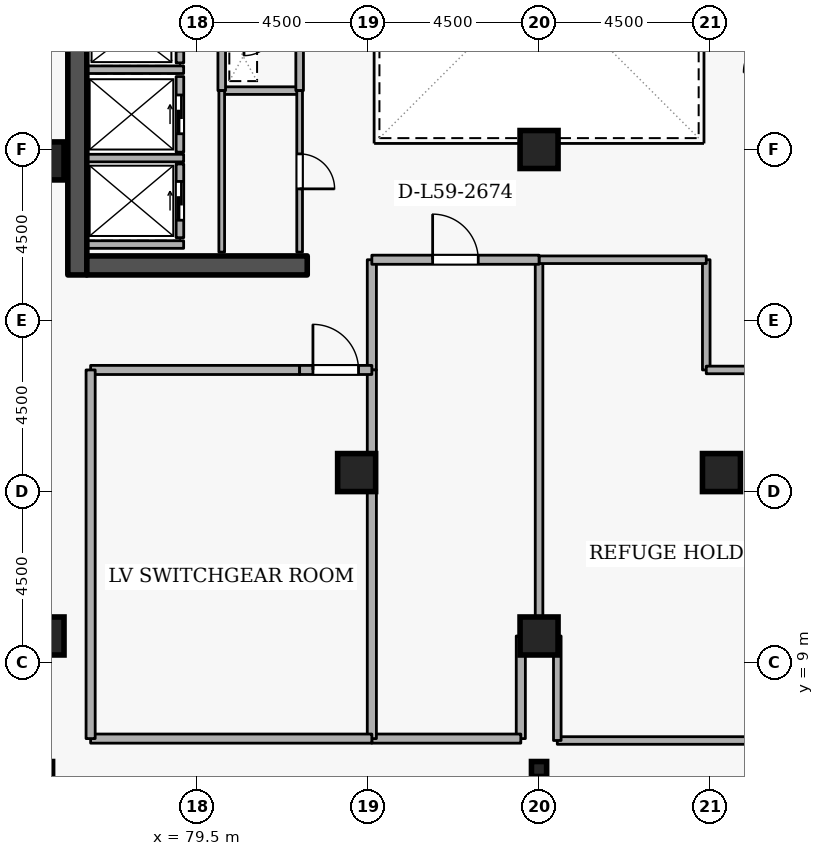
"""IFC4 building model, lengths in metres.
Left out: names, types, materials, properties, quantities, classifications, styles, units other than length and angle.
Written with IfcOpenShell. Run it as: python <this file> out.ifc"""

import sys

from ifc_helpers import new_model, si_unit, direction, frame, frame_2d, origin, origin_2d, place, context, subcontext, project, spatial, rectangle, i_section, extrude, element, fill, save


model = new_model("IFC4")
c1 = context("Model", 3, precision=1e-05, world=origin(), true_north=direction((0.0, 1.0)))
c2 = subcontext(c1, "Body", "Model", "MODEL_VIEW")
j1 = project(units=[si_unit("LENGTHUNIT", "METRE"), si_unit("PLANEANGLEUNIT", "RADIAN")], contexts=[c1])
p1 = place(None, origin())
s1 = spatial("IfcSite", under=j1, at=p1, CompositionType="ELEMENT")
p2 = place(p1, origin())
s2 = spatial("IfcBuilding", under=s1, at=p2, CompositionType="ELEMENT")
p3 = place(p2, frame((0.0, 0.0, 221.7)))
s3 = spatial("IfcBuildingStorey", under=s2, at=p3, CompositionType="ELEMENT", Elevation=221.7)
p4 = place(p3, frame((76.35, 19.2, 0.0), z_axis=(0.0, 0.0, 1.0), x_axis=(0.0, 1.0, 0.0)))
e1 = element("IfcWall", 1, at=p4, inside=s3, PredefinedType="SHEAR", context=c2, shape_type="SweptSolid", body=[
    extrude(rectangle(XDim=15.6, YDim=0.5, at=frame_2d((7.8, 0.0))), origin(), (0.0, 0.0, 1.0), 4.2),
])
p5 = place(p3, frame((76.6, 19.45, 0.0), z_axis=(0.0, 0.0, 1.0), x_axis=(1.0, 0.0, 0.0)))
e2 = element("IfcWall", 2, at=p5, inside=s3, PredefinedType="SHEAR", context=c2, shape_type="SweptSolid", body=[
    extrude(rectangle(XDim=5.8, YDim=0.5, at=frame_2d((2.9, 0.0))), origin(), (0.0, 0.0, 1.0), 4.2),
])
for number, where, z_axis, x_axis in (
    (3, (88.5, 9.7, 0.0), (0.0, 0.0, 1.0), (1.0, 0.0, 0.0)),
    (4, (75.5, 9.7, 0.0), (0.0, 0.0, 1.0), (1.0, 0.0, 0.0)),
    (5, (93.3, 14.0, 0.0), (0.0, 0.0, 1.0), (1.0, 0.0, 0.0)),
    (6, (83.7, 14.0, 0.0), (0.0, 0.0, 1.0), (1.0, 0.0, 0.0)),
    (7, (75.5, 22.2, 0.0), (0.0, 0.0, 1.0), (1.0, 0.0, 0.0)),
    (8, (88.5, 22.5, 0.0), (0.0, 0.0, 1.0), (1.0, 0.0, 0.0)),
):
    element("IfcColumn", number, at=place(p3, frame(where, z_axis=z_axis, x_axis=x_axis)), inside=s3, PredefinedType="COLUMN", context=c2, shape_type="SweptSolid", body=[
        extrude(rectangle(XDim=1.0, YDim=1.0, at=origin_2d()), origin(), (0.0, 0.0, 1.0), 4.2),
    ])
p6 = place(p3, frame((88.5, 6.2, 0.0), z_axis=(0.0, 0.0, 1.0), x_axis=(1.0, 0.0, 0.0)))
e9 = element("IfcColumn", 9, at=p6, inside=s3, PredefinedType="COLUMN", context=c2, shape_type="SweptSolid", body=[
    extrude(i_section(OverallWidth=0.399, OverallDepth=0.394, WebThickness=0.023, FlangeThickness=0.037, FilletRadius=0.015, at=origin_2d()), origin(), (0.0, 0.0, 1.0), 4.2),
])
p7 = place(p3, frame((79.05, 24.78, 0.0), z_axis=(0.0, 0.0, 1.0), x_axis=(0.0, 1.0, 0.0)))
e10 = element("IfcWall", 10, at=p7, inside=s3, PredefinedType="STANDARD", context=c2, shape_type="SweptSolid", body=[
    extrude(rectangle(XDim=1.64, YDim=0.2, at=frame_2d((0.82, 0.0))), origin(), (0.0, 0.0, 1.0), 3.94),
])
p8 = place(p7, frame((0.31, 0.0, 0.0)))
e11 = element("IfcOpeningElement", 11, at=p8, cuts=e10, PredefinedType="OPENING", context=c2, shape_type="SweptSolid", body=[
    extrude(rectangle(XDim=1.02, YDim=2.06, at=frame_2d((0.51, 1.03))), frame((0.0, 0.11, 0.0), z_axis=(0.0, -1.0, 0.0), x_axis=(1.0, 0.0, 0.0)), (0.0, 0.0, 1.0), 0.22),
])
p9 = place(p3, frame((79.05, 22.43, 0.0), z_axis=(0.0, 0.0, 1.0), x_axis=(0.0, 1.0, 0.0)))
e12 = element("IfcWall", 12, at=p9, inside=s3, PredefinedType="STANDARD", context=c2, shape_type="SweptSolid", body=[
    extrude(rectangle(XDim=1.99, YDim=0.2, at=frame_2d((0.995, 0.0))), origin(), (0.0, 0.0, 1.0), 3.94),
])
p10 = place(p9, frame((0.485, 0.0, 0.0)))
e13 = element("IfcOpeningElement", 13, at=p10, cuts=e12, PredefinedType="OPENING", context=c2, shape_type="SweptSolid", body=[
    extrude(rectangle(XDim=1.02, YDim=2.06, at=frame_2d((0.51, 1.03))), frame((0.0, 0.11, 0.0), z_axis=(0.0, -1.0, 0.0), x_axis=(1.0, 0.0, 0.0)), (0.0, 0.0, 1.0), 0.22),
])
p11 = place(p3, frame((79.05, 20.18, 0.0), z_axis=(0.0, 0.0, 1.0), x_axis=(0.0, 1.0, 0.0)))
e14 = element("IfcWall", 14, at=p11, inside=s3, PredefinedType="STANDARD", context=c2, shape_type="SweptSolid", body=[
    extrude(rectangle(XDim=1.94, YDim=0.2, at=frame_2d((0.97, 0.0))), origin(), (0.0, 0.0, 1.0), 3.94),
])
p12 = place(p11, frame((0.46, 0.0, 0.0)))
e15 = element("IfcOpeningElement", 15, at=p12, cuts=e14, PredefinedType="OPENING", context=c2, shape_type="SweptSolid", body=[
    extrude(rectangle(XDim=1.02, YDim=2.06, at=frame_2d((0.51, 1.03))), frame((0.0, 0.11, 0.0), z_axis=(0.0, -1.0, 0.0), x_axis=(1.0, 0.0, 0.0)), (0.0, 0.0, 1.0), 0.22),
])
for number, where, z_axis, x_axis in (
    (16, (76.612, 24.6, 0.0), (0.0, 0.0, 1.0), (1.0, 0.0, 0.0)),
    (17, (76.612, 22.275, 0.0), (0.0, 0.0, 1.0), (1.0, 0.0, 0.0)),
    (18, (76.612, 20.0, 0.0), (0.0, 0.0, 1.0), (1.0, 0.0, 0.0)),
):
    element("IfcWall", number, at=place(p3, frame(where, z_axis=z_axis, x_axis=x_axis)), inside=s3, PredefinedType="STANDARD", context=c2, shape_type="SweptSolid", body=[
        extrude(rectangle(XDim=2.536, YDim=0.2, at=frame_2d((1.268, 0.0))), origin(), (0.0, 0.0, 1.0), 3.94),
    ])
p13 = place(p3, frame((80.15, 24.05, 0.0), z_axis=(0.0, 0.0, 1.0), x_axis=(1.0, 0.0, 0.0)))
e19 = element("IfcWall", 19, at=p13, inside=s3, PredefinedType="STANDARD", context=c2, shape_type="SweptSolid", body=[
    extrude(rectangle(XDim=2.05, YDim=0.2, at=frame_2d((1.025, 0.0))), origin(), (0.0, 0.0, 1.0), 3.94),
])
for number, where, z_axis, x_axis in (
    (20, (82.2, 24.05, 0.0), (0.0, 0.0, 1.0), (0.0, 1.0, 0.0)),
    (21, (80.15, 25.85, 0.0), (0.0, 0.0, 1.0), (0.0, -1.0, 0.0)),
):
    element("IfcWall", number, at=place(p3, frame(where, z_axis=z_axis, x_axis=x_axis)), inside=s3, PredefinedType="STANDARD", context=c2, shape_type="SweptSolid", body=[
        extrude(rectangle(XDim=1.8, YDim=0.2, at=frame_2d((0.9, 0.0))), origin(), (0.0, 0.0, 1.0), 3.94),
    ])
p14 = place(p3, frame((92.9, 19.6, 0.0), z_axis=(0.0, 0.0, 1.0), x_axis=(0.0, -1.0, 0.0)))
e22 = element("IfcWall", 22, at=p14, inside=s3, PredefinedType="STANDARD", context=c2, shape_type="SweptSolid", body=[
    extrude(rectangle(XDim=2.9, YDim=0.2, at=frame_2d((1.45, 0.0))), origin(), (0.0, 0.0, 1.0), 3.94),
])
p15 = place(p3, frame((92.9, 16.7, 0.0), z_axis=(0.0, 0.0, 1.0), x_axis=(1.0, 0.0, 0.0)))
e23 = element("IfcWall", 23, at=p15, inside=s3, PredefinedType="STANDARD", context=c2, shape_type="SweptSolid", body=[
    extrude(rectangle(XDim=1.9, YDim=0.2, at=frame_2d((0.95, 0.0))), origin(), (0.0, 0.0, 1.0), 3.94),
])
p16 = place(p3, frame((101.02, 6.95, 0.0), z_axis=(0.0, 0.0, 1.0), x_axis=(-1.0, 0.0, 0.0)))
e24 = element("IfcWall", 24, at=p16, inside=s3, PredefinedType="STANDARD", context=c2, shape_type="SweptSolid", body=[
    extrude(rectangle(XDim=12.04, YDim=0.2, at=frame_2d((6.02, 0.0))), origin(), (0.0, 0.0, 1.0), 3.94),
])
p17 = place(p3, frame((88.98, 6.95, 0.0), z_axis=(0.0, 0.0, 1.0), x_axis=(0.0, 1.0, 0.0)))
e25 = element("IfcWall", 25, at=p17, inside=s3, PredefinedType="STANDARD", context=c2, shape_type="SweptSolid", body=[
    extrude(rectangle(XDim=2.75, YDim=0.2, at=frame_2d((1.375, 0.0))), origin(), (0.0, 0.0, 1.0), 3.94),
])
p18 = place(p3, frame((88.5, 9.7, 0.0), z_axis=(0.0, 0.0, 1.0), x_axis=(0.0, 1.0, 0.0)))
e26 = element("IfcWall", 26, at=p18, inside=s3, PredefinedType="STANDARD", context=c2, shape_type="SweptSolid", body=[
    extrude(rectangle(XDim=9.9, YDim=0.2, at=frame_2d((4.95, 0.0))), origin(), (0.0, 0.0, 1.0), 3.325),
])
p19 = place(p3, frame((88.5, 19.6, 0.0), z_axis=(0.0, 0.0, 1.0), x_axis=(1.0, 0.0, 0.0)))
e27 = element("IfcWall", 27, at=p19, inside=s3, PredefinedType="STANDARD", context=c2, shape_type="SweptSolid", body=[
    extrude(rectangle(XDim=4.4, YDim=0.2, at=frame_2d((2.2, 0.0))), origin(), (0.0, 0.0, 1.0), 3.145),
])
p20 = place(p3, frame((84.1, 16.7, 0.0), z_axis=(0.0, 0.0, 1.0), x_axis=(0.0, 1.0, 0.0)))
e28 = element("IfcWall", 28, at=p20, inside=s3, PredefinedType="STANDARD", context=c2, shape_type="SweptSolid", body=[
    extrude(rectangle(XDim=2.9, YDim=0.24, at=frame_2d((1.45, 0.0))), origin(), (0.0, 0.0, 1.0), 3.94),
])
p21 = place(p3, frame((84.1, 19.6, 0.0), z_axis=(0.0, 0.0, 1.0), x_axis=(1.0, 0.0, 0.0)))
e29 = element("IfcWall", 29, at=p21, inside=s3, PredefinedType="STANDARD", context=c2, shape_type="SweptSolid", body=[
    extrude(rectangle(XDim=4.4, YDim=0.24, at=frame_2d((2.2, 0.0))), origin(), (0.0, 0.0, 1.0), 3.145),
])
p22 = place(p21, frame((1.6, 0.0, 0.0)))
e30 = element("IfcOpeningElement", 30, at=p22, cuts=e29, PredefinedType="OPENING", context=c2, shape_type="SweptSolid", body=[
    extrude(rectangle(XDim=1.2, YDim=2.1, at=frame_2d((0.6, 1.05))), frame((0.0, 0.13, 0.0), z_axis=(0.0, -1.0, 0.0), x_axis=(1.0, 0.0, 0.0)), (0.0, 0.0, 1.0), 0.26),
])
p23 = place(p3, frame((88.02, 9.7, 0.0), z_axis=(0.0, 0.0, 1.0), x_axis=(0.0, -1.0, 0.0)))
e31 = element("IfcWall", 31, at=p23, inside=s3, PredefinedType="STANDARD", context=c2, shape_type="SweptSolid", body=[
    extrude(rectangle(XDim=2.7, YDim=0.24, at=frame_2d((1.35, 0.0))), origin(), (0.0, 0.0, 1.0), 3.94),
])
p24 = place(p3, frame((88.02, 7.0, 0.0), z_axis=(0.0, 0.0, 1.0), x_axis=(-1.0, 0.0, 0.0)))
e32 = element("IfcWall", 32, at=p24, inside=s3, PredefinedType="STANDARD", context=c2, shape_type="SweptSolid", body=[
    extrude(rectangle(XDim=3.92, YDim=0.24, at=frame_2d((1.96, 0.0))), origin(), (0.0, 0.0, 1.0), 3.94),
])
p25 = place(p3, frame((84.1, 7.0, 0.0), z_axis=(0.0, 0.0, 1.0), x_axis=(0.0, 1.0, 0.0)))
e33 = element("IfcWall", 33, at=p25, inside=s3, PredefinedType="STANDARD", context=c2, shape_type="SweptSolid", body=[
    extrude(rectangle(XDim=9.7, YDim=0.24, at=frame_2d((4.85, 0.0))), origin(), (0.0, 0.0, 1.0), 3.94),
])
p26 = place(p3, frame((76.7, 16.7, 0.0), z_axis=(0.0, 0.0, 1.0), x_axis=(1.0, 0.0, 0.0)))
e34 = element("IfcWall", 34, at=p26, inside=s3, PredefinedType="STANDARD", context=c2, shape_type="SweptSolid", body=[
    extrude(rectangle(XDim=5.5, YDim=0.24, at=frame_2d((2.75, 0.0))), origin(), (0.0, 0.0, 1.0), 3.94),
])
p27 = place(p3, frame((82.2, 16.7, 0.0), z_axis=(0.0, 0.0, 1.0), x_axis=(1.0, 0.0, 0.0)))
e35 = element("IfcWall", 35, at=p27, inside=s3, PredefinedType="STANDARD", context=c2, shape_type="SweptSolid", body=[
    extrude(rectangle(XDim=1.9, YDim=0.24, at=frame_2d((0.95, 0.0))), origin(), (0.0, 0.0, 1.0), 3.94),
])
p28 = place(p27, frame((0.35, 0.0, 0.0)))
e36 = element("IfcOpeningElement", 36, at=p28, cuts=e35, PredefinedType="OPENING", context=c2, shape_type="SweptSolid", body=[
    extrude(rectangle(XDim=1.2, YDim=2.1, at=frame_2d((0.6, 1.05))), frame((0.0, 0.13, 0.0), z_axis=(0.0, -1.0, 0.0), x_axis=(1.0, 0.0, 0.0)), (0.0, 0.0, 1.0), 0.26),
])
p29 = place(p3, frame((84.1, 7.0, 0.0), z_axis=(0.0, 0.0, 1.0), x_axis=(-1.0, 0.0, 0.0)))
e37 = element("IfcWall", 37, at=p29, inside=s3, PredefinedType="STANDARD", context=c2, shape_type="SweptSolid", body=[
    extrude(rectangle(XDim=7.4, YDim=0.24, at=frame_2d((3.7, 0.0))), origin(), (0.0, 0.0, 1.0), 3.445),
])
p30 = place(p3, frame((76.7, 7.0, 0.0), z_axis=(0.0, 0.0, 1.0), x_axis=(0.0, 1.0, 0.0)))
e38 = element("IfcWall", 38, at=p30, inside=s3, PredefinedType="STANDARD", context=c2, shape_type="SweptSolid", body=[
    extrude(rectangle(XDim=9.7, YDim=0.24, at=frame_2d((4.85, 0.0))), origin(), (0.0, 0.0, 1.0), 3.94),
])
p31 = place(p3, frame((80.15, 19.8, 0.0), z_axis=(0.0, 0.0, 1.0), x_axis=(0.0, 1.0, 0.0)))
e39 = element("IfcWall", 39, at=p31, inside=s3, PredefinedType="PARTITIONING", context=c2, shape_type="SweptSolid", body=[
    extrude(rectangle(XDim=4.25, YDim=0.15, at=frame_2d((2.125, 0.0))), origin(), (0.0, 0.0, 1.0), 3.94),
])
p32 = place(p3, frame((82.2, 24.05, 0.0), z_axis=(0.0, 0.0, 1.0), x_axis=(0.0, -1.0, 0.0)))
e40 = element("IfcWall", 40, at=p32, inside=s3, PredefinedType="PARTITIONING", context=c2, shape_type="SweptSolid", body=[
    extrude(rectangle(XDim=4.25, YDim=0.15, at=frame_2d((2.125, 0.0))), origin(), (0.0, 0.0, 1.0), 3.94),
])
p33 = place(p32, frame((1.665, 0.0, 0.0)))
e41 = element("IfcOpeningElement", 41, at=p33, cuts=e40, PredefinedType="OPENING", context=c2, shape_type="SweptSolid", body=[
    extrude(rectangle(XDim=0.92, YDim=2.08, at=frame_2d((0.46, 1.04))), frame((0.0, 0.085, 0.0), z_axis=(0.0, -1.0, 0.0), x_axis=(1.0, 0.0, 0.0)), (0.0, 0.0, 1.0), 0.17),
])
p34 = place(p10, origin())
e42 = element("IfcDoor", 42, at=p34, inside=s3, OperationType="SLIDING_TO_LEFT", PredefinedType="DOOR", context=c2, shape_type="SweptSolid", body=[
    extrude(rectangle(XDim=1.02, YDim=2.06, at=frame_2d((0.51, 1.03))), frame((0.0, 0.025, 0.0), z_axis=(0.0, -1.0, 0.0), x_axis=(1.0, 0.0, 0.0)), (0.0, 0.0, 1.0), 0.05),
])
fill(e13, e42)
p35 = place(p12, origin())
e43 = element("IfcDoor", 43, at=p35, inside=s3, OperationType="SLIDING_TO_LEFT", PredefinedType="DOOR", context=c2, shape_type="SweptSolid", body=[
    extrude(rectangle(XDim=1.02, YDim=2.06, at=frame_2d((0.51, 1.03))), frame((0.0, 0.025, 0.0), z_axis=(0.0, -1.0, 0.0), x_axis=(1.0, 0.0, 0.0)), (0.0, 0.0, 1.0), 0.05),
])
fill(e15, e43)
p36 = place(p33, origin())
e44 = element("IfcDoor", 44, at=p36, inside=s3, OperationType="SINGLE_SWING_RIGHT", PredefinedType="DOOR", context=c2, shape_type="SweptSolid", body=[
    extrude(rectangle(XDim=0.92, YDim=2.08, at=frame_2d((0.46, 1.04))), frame((0.0, 0.025, 0.0), z_axis=(0.0, -1.0, 0.0), x_axis=(1.0, 0.0, 0.0)), (0.0, 0.0, 1.0), 0.05),
])
fill(e41, e44)
p37 = place(p22, origin())
e45 = element("IfcDoor", 45, at=p37, inside=s3, OperationType="SINGLE_SWING_LEFT", PredefinedType="DOOR", context=c2, shape_type="SweptSolid", body=[
    extrude(rectangle(XDim=1.2, YDim=2.1, at=frame_2d((0.6, 1.05))), frame((0.0, 0.025, 0.0), z_axis=(0.0, -1.0, 0.0), x_axis=(1.0, 0.0, 0.0)), (0.0, 0.0, 1.0), 0.05),
])
fill(e30, e45)
p38 = place(p28, origin())
e46 = element("IfcDoor", 46, at=p38, inside=s3, OperationType="SINGLE_SWING_LEFT", PredefinedType="DOOR", context=c2, shape_type="SweptSolid", body=[
    extrude(rectangle(XDim=1.2, YDim=2.1, at=frame_2d((0.6, 1.05))), frame((0.0, 0.025, 0.0), z_axis=(0.0, -1.0, 0.0), x_axis=(1.0, 0.0, 0.0)), (0.0, 0.0, 1.0), 0.05),
])
fill(e36, e46)
save(model, sys.argv[1])
